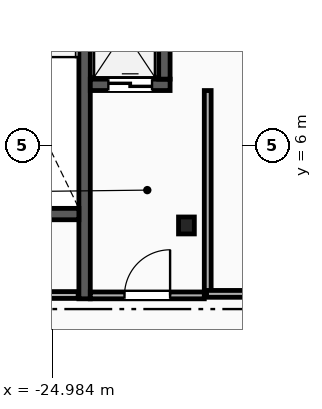
"""IFC4 building model, lengths in metres.
Left out: names, types, materials, properties, quantities, classifications, styles, units other than length and angle.
Written with IfcOpenShell. Run it as: python <this file> out.ifc"""

import sys

from ifc_helpers import new_model, si_unit, direction, frame, frame_2d, origin, origin_2d, place, context, subcontext, project, spatial, rectangle, i_section, extrude, element, fill, save


model = new_model("IFC4")
c1 = context("Model", 3, precision=1e-05, world=origin(), true_north=direction((0.0, 1.0)))
c2 = subcontext(c1, "Body", "Model", "MODEL_VIEW")
j1 = project(units=[si_unit("LENGTHUNIT", "METRE"), si_unit("PLANEANGLEUNIT", "RADIAN")], contexts=[c1])
p1 = place(None, origin())
s1 = spatial("IfcSite", under=j1, at=p1, CompositionType="ELEMENT")
p2 = place(p1, origin())
s2 = spatial("IfcBuilding", under=s1, at=p2, CompositionType="ELEMENT")
p3 = place(p2, frame((0.0, 0.0, 257.6)))
s3 = spatial("IfcBuildingStorey", under=s2, at=p3, CompositionType="ELEMENT", Elevation=257.6)
p4 = place(p3, frame((-21.45, 3.9, 0.0), z_axis=(0.0, 0.0, 1.0), x_axis=(1.0, 0.0, 0.0)))
e1 = element("IfcColumn", 1, at=p4, inside=s3, PredefinedType="COLUMN", context=c2, shape_type="SweptSolid", body=[
    extrude(i_section(OverallWidth=0.416, OverallDepth=0.446, WebThickness=0.039, FlangeThickness=0.063, FilletRadius=0.018, at=origin_2d()), origin(), (0.0, 0.0, 1.0), 3.6),
])
p5 = place(p3, frame((-24.13, 1.97, 0.0), z_axis=(0.0, 0.0, 1.0), x_axis=(0.0, 1.0, 0.0)))
e2 = element("IfcWall", 2, at=p5, inside=s3, PredefinedType="SHEAR", context=c2, shape_type="SweptSolid", body=[
    extrude(rectangle(XDim=10.68, YDim=0.3, at=frame_2d((5.34, 0.0))), origin(), (0.0, 0.0, 1.0), 3.34),
])
p6 = place(p3, frame((-27.44, 4.2, 0.0), z_axis=(0.0, 0.0, 1.0), x_axis=(1.0, 0.0, 0.0)))
e3 = element("IfcWall", 3, at=p6, inside=s3, PredefinedType="SHEAR", context=c2, shape_type="SweptSolid", body=[
    extrude(rectangle(XDim=3.16, YDim=0.3, at=frame_2d((1.58, 0.0))), origin(), (0.0, 0.0, 1.0), 3.34),
])
p7 = place(p3, frame((-20.89, 2.15, 0.0), z_axis=(0.0, 0.0, 1.0), x_axis=(0.0, 1.0, 0.0)))
e4 = element("IfcWall", 4, at=p7, inside=s3, PredefinedType="PARTITIONING", context=c2, shape_type="SweptSolid", body=[
    extrude(rectangle(XDim=5.3, YDim=0.18, at=frame_2d((2.65, 0.0))), origin(), (0.0, 0.0, 1.0), 3.34),
])
p8 = place(p3, frame((-23.98, 2.06, 0.0), z_axis=(0.0, 0.0, 1.0), x_axis=(1.0, 0.0, 0.0)))
e5 = element("IfcWall", 5, at=p8, inside=s3, PredefinedType="PARTITIONING", context=c2, shape_type="SweptSolid", body=[
    extrude(rectangle(XDim=3.0, YDim=0.18, at=frame_2d((1.5, 0.0))), origin(), (0.0, 0.0, 1.0), 3.34),
])
p9 = place(p8, frame((0.9, 0.0, 0.0)))
e6 = element("IfcOpeningElement", 6, at=p9, cuts=e5, PredefinedType="OPENING", context=c2, shape_type="SweptSolid", body=[
    extrude(rectangle(XDim=1.2, YDim=2.15, at=frame_2d((0.6, 1.075))), frame((0.0, 0.1, 0.0), z_axis=(0.0, -1.0, 0.0), x_axis=(1.0, 0.0, 0.0)), (0.0, 0.0, 1.0), 0.2),
])
p10 = place(p3, frame((-23.98, 7.6, 0.0), z_axis=(0.0, 0.0, 1.0), x_axis=(1.0, 0.0, 0.0)))
e7 = element("IfcWall", 7, at=p10, inside=s3, PredefinedType="SHEAR", context=c2, shape_type="SweptSolid", body=[
    extrude(rectangle(XDim=2.1, YDim=0.3, at=frame_2d((1.05, 0.0))), origin(), (0.0, 0.0, 1.0), 3.34),
])
p11 = place(p10, frame((0.475, 0.0, 0.0)))
e8 = element("IfcOpeningElement", 8, at=p11, cuts=e7, PredefinedType="OPENING", context=c2, shape_type="SweptSolid", body=[
    extrude(rectangle(XDim=1.15, YDim=2.2, at=frame_2d((0.575, 1.1))), frame((0.0, 0.16, 0.0), z_axis=(0.0, -1.0, 0.0), x_axis=(1.0, 0.0, 0.0)), (0.0, 0.0, 1.0), 0.32),
])
p12 = place(p3, frame((-22.03, 7.75, 0.0), z_axis=(0.0, 0.0, 1.0), x_axis=(0.0, 1.0, 0.0)))
e9 = element("IfcWall", 9, at=p12, inside=s3, PredefinedType="SHEAR", context=c2, shape_type="SweptSolid", body=[
    extrude(rectangle(XDim=2.5, YDim=0.3, at=frame_2d((1.25, 0.0))), origin(), (0.0, 0.0, 1.0), 3.34),
])
p13 = place(p3, frame((-27.42, 2.07, 0.0), z_axis=(0.0, 0.0, 1.0), x_axis=(1.0, 0.0, 0.0)))
e10 = element("IfcWall", 10, at=p13, inside=s3, PredefinedType="PARTITIONING", context=c2, shape_type="SweptSolid", body=[
    extrude(rectangle(XDim=3.12, YDim=0.18, at=frame_2d((1.56, 0.0))), origin(), (0.0, 0.0, 1.0), 3.34),
])
p14 = place(p13, frame((1.085, 0.0, 0.0)))
e11 = element("IfcOpeningElement", 11, at=p14, cuts=e10, PredefinedType="OPENING", context=c2, shape_type="SweptSolid", body=[
    extrude(rectangle(XDim=0.95, YDim=2.1, at=frame_2d((0.475, 1.05))), frame((0.0, 0.1, 0.0), z_axis=(0.0, -1.0, 0.0), x_axis=(1.0, 0.0, 0.0)), (0.0, 0.0, 1.0), 0.2),
])
p15 = place(p3, frame((-16.9, 2.1, 0.0), z_axis=(0.0, 0.0, 1.0), x_axis=(-1.0, 0.0, 0.0)))
e12 = element("IfcWall", 12, at=p15, inside=s3, PredefinedType="PARTITIONING", context=c2, shape_type="SweptSolid", body=[
    extrude(rectangle(XDim=4.02, YDim=0.18, at=frame_2d((2.01, 0.0))), origin(), (0.0, 0.0, 1.0), 3.34),
])
p16 = place(p9, origin())
e13 = element("IfcDoor", 13, at=p16, inside=s3, OperationType="SINGLE_SWING_RIGHT", PredefinedType="DOOR", context=c2, shape_type="SweptSolid", body=[
    extrude(rectangle(XDim=1.2, YDim=2.15, at=frame_2d((0.6, 1.075))), frame((0.0, 0.025, 0.0), z_axis=(0.0, -1.0, 0.0), x_axis=(1.0, 0.0, 0.0)), (0.0, 0.0, 1.0), 0.05),
])
fill(e6, e13)
p17 = place(p11, origin())
e14 = element("IfcDoor", 14, at=p17, inside=s3, OperationType="SLIDING_TO_LEFT", PredefinedType="TRAPDOOR", context=c2, shape_type="SweptSolid", body=[
    extrude(rectangle(XDim=1.15, YDim=2.2, at=frame_2d((0.575, 1.1))), frame((0.0, 0.025, 0.0), z_axis=(0.0, -1.0, 0.0), x_axis=(1.0, 0.0, 0.0)), (0.0, 0.0, 1.0), 0.05),
])
fill(e8, e14)
save(model, sys.argv[1])
